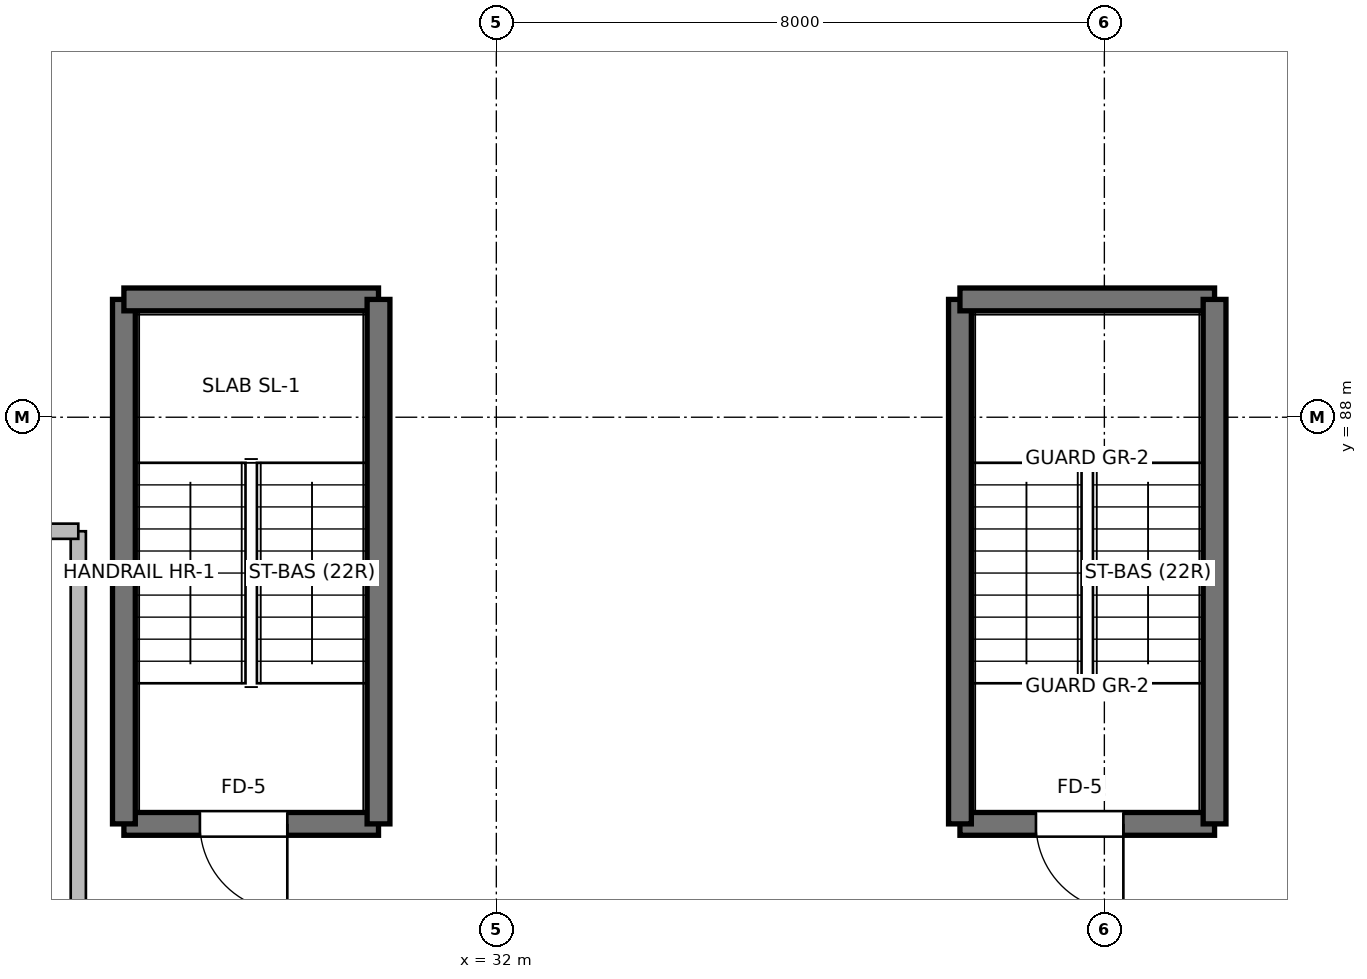
"""IFC4 building model, lengths in metres.
Left out: names, types, materials, properties, quantities, classifications, styles, units other than length and angle.
Written with IfcOpenShell. Run it as: python <this file> out.ifc"""

import sys

from ifc_helpers import new_model, si_unit, direction, frame, frame_2d, origin, place, context, subcontext, project, spatial, rectangle, extrude, element, fill, save


model = new_model("IFC4")
c1 = context("Model", 3, precision=1e-05, world=origin(), true_north=direction((0.0, 1.0)))
c2 = subcontext(c1, "Body", "Model", "MODEL_VIEW")
j1 = project(units=[si_unit("LENGTHUNIT", "METRE"), si_unit("PLANEANGLEUNIT", "RADIAN")], contexts=[c1])
p1 = place(None, origin())
s1 = spatial("IfcSite", under=j1, at=p1, CompositionType="ELEMENT")
p2 = place(p1, origin())
s2 = spatial("IfcBuilding", under=s1, at=p2, CompositionType="ELEMENT")
p3 = place(p2, frame((0.0, 0.0, -3.84)))
s3 = spatial("IfcBuildingStorey", under=s2, at=p3, CompositionType="ELEMENT", Elevation=-3.84)
p4 = place(p3, frame((30.45, 82.65, 0.0), z_axis=(0.0, 0.0, 1.0), x_axis=(-1.0, 0.0, 0.0)))
e1 = element("IfcWall", 1, at=p4, inside=s3, PredefinedType="SHEAR", context=c2, shape_type="SweptSolid", body=[
    extrude(rectangle(XDim=3.35, YDim=0.3, at=frame_2d((1.675, 0.0))), origin(), (0.0, 0.0, 1.0), 3.52),
])
p5 = place(p4, frame((1.2, 0.0, 0.0)))
e2 = element("IfcOpeningElement", 2, at=p5, cuts=e1, PredefinedType="OPENING", context=c2, shape_type="SweptSolid", body=[
    extrude(rectangle(XDim=1.15, YDim=2.2, at=frame_2d((0.575, 1.1))), frame((0.0, 0.16, 0.0), z_axis=(0.0, -1.0, 0.0), x_axis=(1.0, 0.0, 0.0)), (0.0, 0.0, 1.0), 0.32),
])
p6 = place(p3, frame((27.1, 82.65, 0.0), z_axis=(0.0, 0.0, 1.0), x_axis=(0.0, 1.0, 0.0)))
e3 = element("IfcWall", 3, at=p6, inside=s3, PredefinedType="SHEAR", context=c2, shape_type="SweptSolid", body=[
    extrude(rectangle(XDim=6.9, YDim=0.3, at=frame_2d((3.45, 0.0))), origin(), (0.0, 0.0, 1.0), 3.52),
])
p7 = place(p3, frame((27.1, 89.55, 0.0), z_axis=(0.0, 0.0, 1.0), x_axis=(1.0, 0.0, 0.0)))
e4 = element("IfcWall", 4, at=p7, inside=s3, PredefinedType="SHEAR", context=c2, shape_type="SweptSolid", body=[
    extrude(rectangle(XDim=3.35, YDim=0.3, at=frame_2d((1.675, 0.0))), origin(), (0.0, 0.0, 1.0), 3.52),
])
p8 = place(p3, frame((30.45, 89.55, 0.0), z_axis=(0.0, 0.0, 1.0), x_axis=(0.0, -1.0, 0.0)))
e5 = element("IfcWall", 5, at=p8, inside=s3, PredefinedType="SHEAR", context=c2, shape_type="SweptSolid", body=[
    extrude(rectangle(XDim=6.9, YDim=0.3, at=frame_2d((3.45, 0.0))), origin(), (0.0, 0.0, 1.0), 3.52),
])
p9 = place(p3, frame((41.45, 82.65, 0.0), z_axis=(0.0, 0.0, 1.0), x_axis=(-1.0, 0.0, 0.0)))
e6 = element("IfcWall", 6, at=p9, inside=s3, PredefinedType="SHEAR", context=c2, shape_type="SweptSolid", body=[
    extrude(rectangle(XDim=3.35, YDim=0.3, at=frame_2d((1.675, 0.0))), origin(), (0.0, 0.0, 1.0), 3.52),
])
p10 = place(p9, frame((1.2, 0.0, 0.0)))
e7 = element("IfcOpeningElement", 7, at=p10, cuts=e6, PredefinedType="OPENING", context=c2, shape_type="SweptSolid", body=[
    extrude(rectangle(XDim=1.15, YDim=2.2, at=frame_2d((0.575, 1.1))), frame((0.0, 0.16, 0.0), z_axis=(0.0, -1.0, 0.0), x_axis=(1.0, 0.0, 0.0)), (0.0, 0.0, 1.0), 0.32),
])
p11 = place(p3, frame((38.1, 82.65, 0.0), z_axis=(0.0, 0.0, 1.0), x_axis=(0.0, 1.0, 0.0)))
e8 = element("IfcWall", 8, at=p11, inside=s3, PredefinedType="SHEAR", context=c2, shape_type="SweptSolid", body=[
    extrude(rectangle(XDim=6.9, YDim=0.3, at=frame_2d((3.45, 0.0))), origin(), (0.0, 0.0, 1.0), 3.52),
])
p12 = place(p3, frame((38.1, 89.55, 0.0), z_axis=(0.0, 0.0, 1.0), x_axis=(1.0, 0.0, 0.0)))
e9 = element("IfcWall", 9, at=p12, inside=s3, PredefinedType="SHEAR", context=c2, shape_type="SweptSolid", body=[
    extrude(rectangle(XDim=3.35, YDim=0.3, at=frame_2d((1.675, 0.0))), origin(), (0.0, 0.0, 1.0), 3.52),
])
p13 = place(p3, frame((41.45, 89.55, 0.0), z_axis=(0.0, 0.0, 1.0), x_axis=(0.0, -1.0, 0.0)))
e10 = element("IfcWall", 10, at=p13, inside=s3, PredefinedType="SHEAR", context=c2, shape_type="SweptSolid", body=[
    extrude(rectangle(XDim=6.9, YDim=0.3, at=frame_2d((3.45, 0.0))), origin(), (0.0, 0.0, 1.0), 3.52),
])
p14 = place(p3, frame((26.5, 77.2, 0.0), z_axis=(0.0, 0.0, 1.0), x_axis=(0.0, 1.0, 0.0)))
e11 = element("IfcWall", 11, at=p14, inside=s3, PredefinedType="SOLIDWALL", context=c2, shape_type="SweptSolid", body=[
    extrude(rectangle(XDim=9.3, YDim=0.2, at=frame_2d((4.65, 0.0))), origin(), (0.0, 0.0, 1.0), 3.52),
])
p15 = place(p3, frame((26.5, 86.5, 0.0), z_axis=(0.0, 0.0, 1.0), x_axis=(-1.0, 0.0, 0.0)))
e12 = element("IfcWall", 12, at=p15, inside=s3, PredefinedType="SOLIDWALL", context=c2, shape_type="SweptSolid", body=[
    extrude(rectangle(XDim=9.3, YDim=0.2, at=frame_2d((4.65, 0.0))), origin(), (0.0, 0.0, 1.0), 3.52),
])
p16 = place(p15, frame((4.15, 0.0, 0.0)))
e13 = element("IfcOpeningElement", 13, at=p16, cuts=e12, PredefinedType="OPENING", context=c2, shape_type="SweptSolid", body=[
    extrude(rectangle(XDim=1.0, YDim=2.1, at=frame_2d((0.5, 1.05))), frame((0.0, 0.11, 0.0), z_axis=(0.0, -1.0, 0.0), x_axis=(1.0, 0.0, 0.0)), (0.0, 0.0, 1.0), 0.22),
])
p17 = place(p5, origin())
e14 = element("IfcDoor", 14, at=p17, inside=s3, OperationType="SINGLE_SWING_LEFT", PredefinedType="DOOR", context=c2, shape_type="SweptSolid", body=[
    extrude(rectangle(XDim=1.15, YDim=2.2, at=frame_2d((0.575, 1.1))), frame((0.0, 0.025, 0.0), z_axis=(0.0, -1.0, 0.0), x_axis=(1.0, 0.0, 0.0)), (0.0, 0.0, 1.0), 0.05),
])
fill(e2, e14)
p18 = place(p10, origin())
e15 = element("IfcDoor", 15, at=p18, inside=s3, OperationType="SINGLE_SWING_LEFT", PredefinedType="DOOR", context=c2, shape_type="SweptSolid", body=[
    extrude(rectangle(XDim=1.15, YDim=2.2, at=frame_2d((0.575, 1.1))), frame((0.0, 0.025, 0.0), z_axis=(0.0, -1.0, 0.0), x_axis=(1.0, 0.0, 0.0)), (0.0, 0.0, 1.0), 0.05),
])
fill(e7, e15)
save(model, sys.argv[1])
